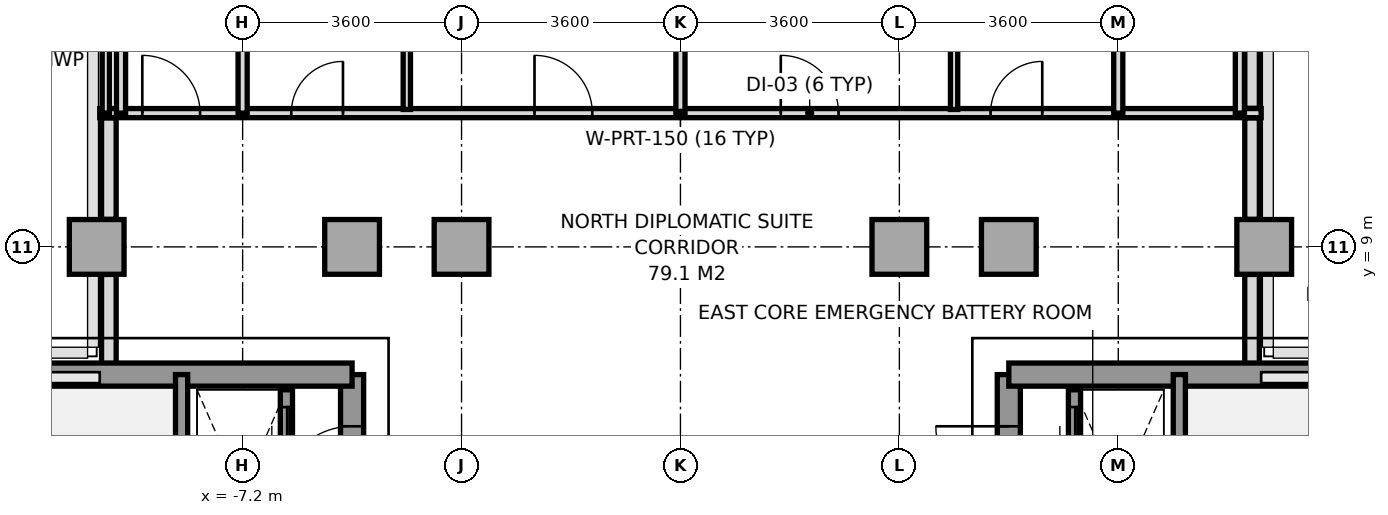
"""IFC4 building model, lengths in metres.
Left out: names, types, materials, properties, quantities, classifications, styles, units other than length and angle.
Written with IfcOpenShell. Run it as: python <this file> out.ifc"""

import sys

from ifc_helpers import new_model, si_unit, direction, frame, frame_2d, origin, origin_2d, place, context, subcontext, project, spatial, rectangle, extrude, source, transform, mapped, element, fill, save


model = new_model("IFC4")
c1 = context("Model", 3, precision=1e-05, world=origin(), true_north=direction((0.0, 1.0)))
c2 = subcontext(c1, "Body", "Model", "MODEL_VIEW")
j1 = project(units=[si_unit("LENGTHUNIT", "METRE"), si_unit("PLANEANGLEUNIT", "RADIAN")], contexts=[c1])
p1 = place(None, origin())
s1 = spatial("IfcSite", under=j1, at=p1, CompositionType="ELEMENT")
p2 = place(p1, origin())
s2 = spatial("IfcBuilding", under=s1, at=p2, CompositionType="ELEMENT")
p3 = place(p2, frame((0.0, 0.0, 197.8)))
s3 = spatial("IfcBuildingStorey", under=s2, at=p3, CompositionType="ELEMENT", Elevation=197.8)
m1 = source(origin(), c2, "Body", "SweptSolid", [
    extrude(rectangle(XDim=0.9, YDim=0.9, at=origin_2d()), origin(), (0.0, 0.0, 1.0), 3.2),
])
for number, where, z_axis, x_axis in (
    (1, (-9.6, 9.0, 0.0), (0.0, 0.0, 1.0), (1.0, 0.0, 0.0)),
    (2, (-5.4, 9.0, 0.0), (0.0, 0.0, 1.0), (1.0, 0.0, 0.0)),
    (3, (-3.6, 9.0, 0.0), (0.0, 0.0, 1.0), (1.0, 0.0, 0.0)),
    (4, (3.6, 9.0, 0.0), (0.0, 0.0, 1.0), (1.0, 0.0, 0.0)),
    (5, (5.4, 9.0, 0.0), (0.0, 0.0, 1.0), (1.0, 0.0, 0.0)),
    (6, (9.6, 9.0, 0.0), (0.0, 0.0, 1.0), (1.0, 0.0, 0.0)),
):
    element("IfcColumn", number, at=place(p3, frame(where, z_axis=z_axis, x_axis=x_axis)), inside=s3, PredefinedType="COLUMN", context=c2, shape_type="MappedRepresentation", body=[
        mapped(m1, transform((0.0, 0.0, 0.0), x_axis=(1.0, 0.0, 0.0), y_axis=(0.0, 1.0, 0.0), z_axis=(0.0, 0.0, 1.0), scale=1.0)),
    ])
p4 = place(p3, frame((-9.4, 6.953, 0.0), z_axis=(0.0, 0.0, 1.0), x_axis=(0.0, 1.0, 0.0)))
e7 = element("IfcWall", 7, at=p4, inside=s3, PredefinedType="PARAPET", context=c2, shape_type="SweptSolid", body=[
    extrude(rectangle(XDim=1.594, YDim=0.24, at=frame_2d((0.797, 0.0))), origin(), (0.0, 0.0, 1.0), 1.15),
])
p5 = place(p3, frame((-9.4, 9.453, 0.0), z_axis=(0.0, 0.0, 1.0), x_axis=(0.0, 1.0, 0.0)))
e8 = element("IfcWall", 8, at=p5, inside=s3, PredefinedType="PARAPET", context=c2, shape_type="SweptSolid", body=[
    extrude(rectangle(XDim=1.669, YDim=0.24, at=frame_2d((0.834, 0.0))), origin(), (0.0, 0.0, 1.0), 1.15),
])
p6 = place(p3, frame((9.4, 15.358, 0.0), z_axis=(0.0, 0.0, 1.0), x_axis=(0.0, -1.0, 0.0)))
e9 = element("IfcWall", 9, at=p6, inside=s3, PredefinedType="PARAPET", context=c2, shape_type="SweptSolid", body=[
    extrude(rectangle(XDim=4.08, YDim=0.24, at=frame_2d((2.04, 0.0))), origin(), (0.0, 0.0, 1.0), 1.15),
])
p7 = place(p3, frame((9.4, 11.122, 0.0), z_axis=(0.0, 0.0, 1.0), x_axis=(0.0, -1.0, 0.0)))
e10 = element("IfcWall", 10, at=p7, inside=s3, PredefinedType="PARAPET", context=c2, shape_type="SweptSolid", body=[
    extrude(rectangle(XDim=1.669, YDim=0.24, at=frame_2d((0.834, 0.0))), origin(), (0.0, 0.0, 1.0), 1.15),
])
p8 = place(p3, frame((9.4, 8.547, 0.0), z_axis=(0.0, 0.0, 1.0), x_axis=(0.0, -1.0, 0.0)))
e11 = element("IfcWall", 11, at=p8, inside=s3, PredefinedType="PARAPET", context=c2, shape_type="SweptSolid", body=[
    extrude(rectangle(XDim=1.594, YDim=0.24, at=frame_2d((0.797, 0.0))), origin(), (0.0, 0.0, 1.0), 1.15),
])
p9 = place(p3, frame((-5.4, -5.6, 0.0), z_axis=(0.0, 0.0, 1.0), x_axis=(0.0, 1.0, 0.0)))
e12 = element("IfcWall", 12, at=p9, inside=s3, PredefinedType="SHEAR", context=c2, shape_type="SweptSolid", body=[
    extrude(rectangle(XDim=12.5, YDim=0.38, at=frame_2d((6.25, 0.0))), origin(), (0.0, 0.0, 1.0), 3.2),
])
p10 = place(p9, frame((4.55, 0.0, 0.0)))
e13 = element("IfcOpeningElement", 13, at=p10, cuts=e12, PredefinedType="OPENING", context=c2, shape_type="SweptSolid", body=[
    extrude(rectangle(XDim=1.2, YDim=2.2, at=frame_2d((0.6, 1.1))), frame((0.0, 0.2, 0.0), z_axis=(0.0, -1.0, 0.0), x_axis=(1.0, 0.0, 0.0)), (0.0, 0.0, 1.0), 0.4),
])
p11 = place(p9, frame((10.45, 0.0, 0.0)))
e14 = element("IfcOpeningElement", 14, at=p11, cuts=e12, PredefinedType="OPENING", context=c2, shape_type="SweptSolid", body=[
    extrude(rectangle(XDim=1.2, YDim=2.2, at=frame_2d((0.6, 1.1))), frame((0.0, 0.2, 0.0), z_axis=(0.0, -1.0, 0.0), x_axis=(1.0, 0.0, 0.0)), (0.0, 0.0, 1.0), 0.4),
])
p12 = place(p3, frame((-11.356, 6.9, 0.0), z_axis=(0.0, 0.0, 1.0), x_axis=(1.0, 0.0, 0.0)))
e15 = element("IfcWall", 15, at=p12, inside=s3, PredefinedType="SHEAR", context=c2, shape_type="SweptSolid", body=[
    extrude(rectangle(XDim=5.956, YDim=0.38, at=frame_2d((2.978, 0.0))), origin(), (0.0, 0.0, 1.0), 3.2),
])
p13 = place(p3, frame((-8.204, -0.016, 0.0), z_axis=(0.0, 0.0, 1.0), x_axis=(0.0, 1.0, 0.0)))
e16 = element("IfcWall", 16, at=p13, inside=s3, PredefinedType="SOLIDWALL", context=c2, shape_type="SweptSolid", body=[
    extrude(rectangle(XDim=6.916, YDim=0.2, at=frame_2d((3.458, 0.0))), origin(), (0.0, 0.0, 1.0), 3.2),
])
p14 = place(p13, frame((0.2, 0.0, 0.0)))
e17 = element("IfcOpeningElement", 17, at=p14, cuts=e16, PredefinedType="OPENING", context=c2, shape_type="SweptSolid", body=[
    extrude(rectangle(XDim=1.2, YDim=2.2, at=frame_2d((0.6, 1.1))), frame((0.0, 0.11, 0.0), z_axis=(0.0, -1.0, 0.0), x_axis=(1.0, 0.0, 0.0)), (0.0, 0.0, 1.0), 0.22),
])
p15 = place(p3, frame((5.4, -5.6, 0.0), z_axis=(0.0, 0.0, 1.0), x_axis=(0.0, 1.0, 0.0)))
e18 = element("IfcWall", 18, at=p15, inside=s3, PredefinedType="SHEAR", context=c2, shape_type="SweptSolid", body=[
    extrude(rectangle(XDim=12.5, YDim=0.38, at=frame_2d((6.25, 0.0))), origin(), (0.0, 0.0, 1.0), 3.2),
])
p16 = place(p15, frame((4.55, 0.0, 0.0)))
e19 = element("IfcOpeningElement", 19, at=p16, cuts=e18, PredefinedType="OPENING", context=c2, shape_type="SweptSolid", body=[
    extrude(rectangle(XDim=1.2, YDim=2.2, at=frame_2d((0.6, 1.1))), frame((0.0, 0.2, 0.0), z_axis=(0.0, -1.0, 0.0), x_axis=(1.0, 0.0, 0.0)), (0.0, 0.0, 1.0), 0.4),
])
p17 = place(p15, frame((10.45, 0.0, 0.0)))
e20 = element("IfcOpeningElement", 20, at=p17, cuts=e18, PredefinedType="OPENING", context=c2, shape_type="SweptSolid", body=[
    extrude(rectangle(XDim=1.2, YDim=2.2, at=frame_2d((0.6, 1.1))), frame((0.0, 0.2, 0.0), z_axis=(0.0, -1.0, 0.0), x_axis=(1.0, 0.0, 0.0)), (0.0, 0.0, 1.0), 0.4),
])
p18 = place(p15, frame((7.88, 0.0, 0.0)))
e21 = element("IfcOpeningElement", 21, at=p18, cuts=e18, PredefinedType="OPENING", context=c2, shape_type="SweptSolid", body=[
    extrude(rectangle(XDim=0.8, YDim=2.1, at=frame_2d((0.4, 1.05))), frame((0.0, 0.2, 0.0), z_axis=(0.0, -1.0, 0.0), x_axis=(1.0, 0.0, 0.0)), (0.0, 0.0, 1.0), 0.4),
])
p19 = place(p3, frame((5.4, 6.9, 0.0), z_axis=(0.0, 0.0, 1.0), x_axis=(1.0, 0.0, 0.0)))
e22 = element("IfcWall", 22, at=p19, inside=s3, PredefinedType="SHEAR", context=c2, shape_type="SweptSolid", body=[
    extrude(rectangle(XDim=5.956, YDim=0.38, at=frame_2d((2.978, 0.0))), origin(), (0.0, 0.0, 1.0), 3.2),
])
p20 = place(p3, frame((8.204, -0.016, 0.0), z_axis=(0.0, 0.0, 1.0), x_axis=(0.0, 1.0, 0.0)))
e23 = element("IfcWall", 23, at=p20, inside=s3, PredefinedType="SOLIDWALL", context=c2, shape_type="SweptSolid", body=[
    extrude(rectangle(XDim=6.916, YDim=0.2, at=frame_2d((3.458, 0.0))), origin(), (0.0, 0.0, 1.0), 3.2),
])
p21 = place(p20, frame((0.2, 0.0, 0.0)))
e24 = element("IfcOpeningElement", 24, at=p21, cuts=e23, PredefinedType="OPENING", context=c2, shape_type="SweptSolid", body=[
    extrude(rectangle(XDim=1.2, YDim=2.2, at=frame_2d((0.6, 1.1))), frame((0.0, 0.11, 0.0), z_axis=(0.0, -1.0, 0.0), x_axis=(1.0, 0.0, 0.0)), (0.0, 0.0, 1.0), 0.22),
])
p22 = place(p3, frame((-6.48, 4.98, 0.0), z_axis=(0.0, 0.0, 1.0), x_axis=(0.0, 1.0, 0.0)))
e25 = element("IfcWall", 25, at=p22, inside=s3, PredefinedType="SOLIDWALL", context=c2, shape_type="SweptSolid", body=[
    extrude(rectangle(XDim=1.67, YDim=0.2, at=frame_2d((0.835, 0.0))), origin(), (0.0, 0.0, 1.0), 3.2),
])
p23 = place(p22, frame((0.285, 0.0, 0.0)))
e26 = element("IfcOpeningElement", 26, at=p23, cuts=e25, PredefinedType="OPENING", context=c2, shape_type="SweptSolid", body=[
    extrude(rectangle(XDim=1.1, YDim=2.2, at=frame_2d((0.55, 1.1))), frame((0.0, 0.11, 0.0), z_axis=(0.0, -1.0, 0.0), x_axis=(1.0, 0.0, 0.0)), (0.0, 0.0, 1.0), 0.22),
])
p24 = place(p3, frame((6.48, 4.98, 0.0), z_axis=(0.0, 0.0, 1.0), x_axis=(0.0, 1.0, 0.0)))
e27 = element("IfcWall", 27, at=p24, inside=s3, PredefinedType="SOLIDWALL", context=c2, shape_type="SweptSolid", body=[
    extrude(rectangle(XDim=1.67, YDim=0.2, at=frame_2d((0.835, 0.0))), origin(), (0.0, 0.0, 1.0), 3.2),
])
p25 = place(p24, frame((0.285, 0.0, 0.0)))
e28 = element("IfcOpeningElement", 28, at=p25, cuts=e27, PredefinedType="OPENING", context=c2, shape_type="SweptSolid", body=[
    extrude(rectangle(XDim=1.1, YDim=2.2, at=frame_2d((0.55, 1.1))), frame((0.0, 0.11, 0.0), z_axis=(0.0, -1.0, 0.0), x_axis=(1.0, 0.0, 0.0)), (0.0, 0.0, 1.0), 0.22),
])
p26 = place(p3, frame((-9.55, 11.2, 0.0), z_axis=(0.0, 0.0, 1.0), x_axis=(1.0, 0.0, 0.0)))
e29 = element("IfcWall", 29, at=p26, inside=s3, PredefinedType="PARTITIONING", context=c2, shape_type="SweptSolid", body=[
    extrude(rectangle(XDim=19.1, YDim=0.15, at=frame_2d((9.55, 0.0))), origin(), (0.0, 0.0, 1.0), 3.2),
])
p27 = place(p26, frame((0.7, 0.0, 0.0)))
e30 = element("IfcOpeningElement", 30, at=p27, cuts=e29, PredefinedType="OPENING", context=c2, shape_type="SweptSolid", body=[
    extrude(rectangle(XDim=0.95, YDim=2.15, at=frame_2d((0.475, 1.075))), frame((0.0, 0.085, 0.0), z_axis=(0.0, -1.0, 0.0), x_axis=(1.0, 0.0, 0.0)), (0.0, 0.0, 1.0), 0.17),
])
p28 = place(p26, frame((3.15, 0.0, 0.0)))
e31 = element("IfcOpeningElement", 31, at=p28, cuts=e29, PredefinedType="OPENING", context=c2, shape_type="SweptSolid", body=[
    extrude(rectangle(XDim=0.85, YDim=2.1, at=frame_2d((0.425, 1.05))), frame((0.0, 0.085, 0.0), z_axis=(0.0, -1.0, 0.0), x_axis=(1.0, 0.0, 0.0)), (0.0, 0.0, 1.0), 0.17),
])
p29 = place(p26, frame((7.15, 0.0, 0.0)))
e32 = element("IfcOpeningElement", 32, at=p29, cuts=e29, PredefinedType="OPENING", context=c2, shape_type="SweptSolid", body=[
    extrude(rectangle(XDim=0.95, YDim=2.15, at=frame_2d((0.475, 1.075))), frame((0.0, 0.085, 0.0), z_axis=(0.0, -1.0, 0.0), x_axis=(1.0, 0.0, 0.0)), (0.0, 0.0, 1.0), 0.17),
])
p30 = place(p26, frame((14.65, 0.0, 0.0)))
e33 = element("IfcOpeningElement", 33, at=p30, cuts=e29, PredefinedType="OPENING", context=c2, shape_type="SweptSolid", body=[
    extrude(rectangle(XDim=0.85, YDim=2.1, at=frame_2d((0.425, 1.05))), frame((0.0, 0.085, 0.0), z_axis=(0.0, -1.0, 0.0), x_axis=(1.0, 0.0, 0.0)), (0.0, 0.0, 1.0), 0.17),
])
p31 = place(p26, frame((11.2, 0.0, 0.0)))
e34 = element("IfcOpeningElement", 34, at=p31, cuts=e29, PredefinedType="OPENING", context=c2, shape_type="SweptSolid", body=[
    extrude(rectangle(XDim=0.95, YDim=2.15, at=frame_2d((0.475, 1.075))), frame((0.0, 0.085, 0.0), z_axis=(0.0, -1.0, 0.0), x_axis=(1.0, 0.0, 0.0)), (0.0, 0.0, 1.0), 0.17),
])
for number, where, z_axis, x_axis in (
    (35, (-9.2, 11.2, 0.0), (0.0, 0.0, 1.0), (0.0, 1.0, 0.0)),
    (36, (9.2, 11.2, 0.0), (0.0, 0.0, 1.0), (0.0, 1.0, 0.0)),
):
    element("IfcWall", number, at=place(p3, frame(where, z_axis=z_axis, x_axis=x_axis)), inside=s3, PredefinedType="PARTITIONING", context=c2, shape_type="SweptSolid", body=[
        extrude(rectangle(XDim=4.48, YDim=0.15, at=frame_2d((2.24, 0.0))), origin(), (0.0, 0.0, 1.0), 3.2),
    ])
p32 = place(p3, frame((-7.2, 11.2, 0.0), z_axis=(0.0, 0.0, 1.0), x_axis=(0.0, 1.0, 0.0)))
e37 = element("IfcWall", 37, at=p32, inside=s3, PredefinedType="PARTITIONING", context=c2, shape_type="SweptSolid", body=[
    extrude(rectangle(XDim=12.2, YDim=0.15, at=frame_2d((6.1, 0.0))), origin(), (0.0, 0.0, 1.0), 2.75),
])
p33 = place(p3, frame((0.0, 11.2, 0.0), z_axis=(0.0, 0.0, 1.0), x_axis=(0.0, 1.0, 0.0)))
e38 = element("IfcWall", 38, at=p33, inside=s3, PredefinedType="PARTITIONING", context=c2, shape_type="SweptSolid", body=[
    extrude(rectangle(XDim=13.45, YDim=0.15, at=frame_2d((6.725, 0.0))), origin(), (0.0, 0.0, 1.0), 2.75),
])
p34 = place(p3, frame((7.2, 11.2, 0.0), z_axis=(0.0, 0.0, 1.0), x_axis=(0.0, 1.0, 0.0)))
e39 = element("IfcWall", 39, at=p34, inside=s3, PredefinedType="PARTITIONING", context=c2, shape_type="SweptSolid", body=[
    extrude(rectangle(XDim=12.2, YDim=0.15, at=frame_2d((6.1, 0.0))), origin(), (0.0, 0.0, 1.0), 2.75),
])
p35 = place(p3, frame((-9.45, 11.2, 0.0), z_axis=(0.0, 0.0, 1.0), x_axis=(0.0, 1.0, 0.0)))
e40 = element("IfcWall", 40, at=p35, inside=s3, PredefinedType="PARTITIONING", context=c2, shape_type="SweptSolid", body=[
    extrude(rectangle(XDim=3.6, YDim=0.12, at=frame_2d((1.8, 0.0))), origin(), (0.0, 0.0, 1.0), 3.2),
])
for number, where, z_axis, x_axis in (
    (41, (-4.5, 11.26, 0.0), (0.0, 0.0, 1.0), (0.0, 1.0, 0.0)),
    (42, (4.5, 11.26, 0.0), (0.0, 0.0, 1.0), (0.0, 1.0, 0.0)),
):
    element("IfcWall", number, at=place(p3, frame(where, z_axis=z_axis, x_axis=x_axis)), inside=s3, PredefinedType="PARTITIONING", context=c2, shape_type="SweptSolid", body=[
        extrude(rectangle(XDim=3.1, YDim=0.12, at=frame_2d((1.55, 0.0))), origin(), (0.0, 0.0, 1.0), 2.75),
    ])
m2 = source(origin(), c2, "Body", "SweptSolid", [
    extrude(rectangle(XDim=1.2, YDim=2.2, at=frame_2d((0.6, 1.1))), frame((0.0, 0.025, 0.0), z_axis=(0.0, -1.0, 0.0), x_axis=(1.0, 0.0, 0.0)), (0.0, 0.0, 1.0), 0.05),
])
p36 = place(p11, origin())
e43 = element("IfcDoor", 43, at=p36, inside=s3, OperationType="SINGLE_SWING_LEFT", PredefinedType="DOOR", context=c2, shape_type="MappedRepresentation", body=[
    mapped(m2, transform((0.0, 0.0, 0.0), x_axis=(1.0, 0.0, 0.0), y_axis=(0.0, 1.0, 0.0), z_axis=(0.0, 0.0, 1.0), scale=1.0)),
])
fill(e14, e43)
p37 = place(p17, origin())
e44 = element("IfcDoor", 44, at=p37, inside=s3, OperationType="SINGLE_SWING_RIGHT", PredefinedType="DOOR", context=c2, shape_type="MappedRepresentation", body=[
    mapped(m2, transform((0.0, 0.0, 0.0), x_axis=(1.0, 0.0, 0.0), y_axis=(0.0, 1.0, 0.0), z_axis=(0.0, 0.0, 1.0), scale=1.0)),
])
fill(e20, e44)
m3 = source(origin(), c2, "Body", "SweptSolid", [
    extrude(rectangle(XDim=1.1, YDim=2.2, at=frame_2d((0.55, 1.1))), frame((0.0, 0.025, 0.0), z_axis=(0.0, -1.0, 0.0), x_axis=(1.0, 0.0, 0.0)), (0.0, 0.0, 1.0), 0.05),
])
p38 = place(p23, origin())
e45 = element("IfcDoor", 45, at=p38, inside=s3, OperationType="SLIDING_TO_LEFT", PredefinedType="DOOR", context=c2, shape_type="MappedRepresentation", body=[
    mapped(m3, transform((0.0, 0.0, 0.0), x_axis=(1.0, 0.0, 0.0), y_axis=(0.0, 1.0, 0.0), z_axis=(0.0, 0.0, 1.0), scale=1.0)),
])
fill(e26, e45)
p39 = place(p25, origin())
e46 = element("IfcDoor", 46, at=p39, inside=s3, OperationType="SLIDING_TO_LEFT", PredefinedType="DOOR", context=c2, shape_type="MappedRepresentation", body=[
    mapped(m3, transform((0.0, 0.0, 0.0), x_axis=(1.0, 0.0, 0.0), y_axis=(0.0, 1.0, 0.0), z_axis=(0.0, 0.0, 1.0), scale=1.0)),
])
fill(e28, e46)
m4 = source(origin(), c2, "Body", "SweptSolid", [
    extrude(rectangle(XDim=0.95, YDim=2.15, at=frame_2d((0.475, 1.075))), frame((0.0, 0.025, 0.0), z_axis=(0.0, -1.0, 0.0), x_axis=(1.0, 0.0, 0.0)), (0.0, 0.0, 1.0), 0.05),
])
p40 = place(p27, origin())
e47 = element("IfcDoor", 47, at=p40, inside=s3, OperationType="SINGLE_SWING_LEFT", PredefinedType="DOOR", context=c2, shape_type="MappedRepresentation", body=[
    mapped(m4, transform((0.0, 0.0, 0.0), x_axis=(1.0, 0.0, 0.0), y_axis=(0.0, 1.0, 0.0), z_axis=(0.0, 0.0, 1.0), scale=1.0)),
])
fill(e30, e47)
m5 = source(origin(), c2, "Body", "SweptSolid", [
    extrude(rectangle(XDim=0.85, YDim=2.1, at=frame_2d((0.425, 1.05))), frame((0.0, 0.025, 0.0), z_axis=(0.0, -1.0, 0.0), x_axis=(1.0, 0.0, 0.0)), (0.0, 0.0, 1.0), 0.05),
])
p41 = place(p28, origin())
e48 = element("IfcDoor", 48, at=p41, inside=s3, OperationType="SINGLE_SWING_RIGHT", PredefinedType="DOOR", context=c2, shape_type="MappedRepresentation", body=[
    mapped(m5, transform((0.0, 0.0, 0.0), x_axis=(1.0, 0.0, 0.0), y_axis=(0.0, 1.0, 0.0), z_axis=(0.0, 0.0, 1.0), scale=1.0)),
])
fill(e31, e48)
p42 = place(p29, origin())
e49 = element("IfcDoor", 49, at=p42, inside=s3, OperationType="SINGLE_SWING_LEFT", PredefinedType="DOOR", context=c2, shape_type="MappedRepresentation", body=[
    mapped(m4, transform((0.0, 0.0, 0.0), x_axis=(1.0, 0.0, 0.0), y_axis=(0.0, 1.0, 0.0), z_axis=(0.0, 0.0, 1.0), scale=1.0)),
])
fill(e32, e49)
p43 = place(p30, origin())
e50 = element("IfcDoor", 50, at=p43, inside=s3, OperationType="SINGLE_SWING_RIGHT", PredefinedType="DOOR", context=c2, shape_type="MappedRepresentation", body=[
    mapped(m5, transform((0.0, 0.0, 0.0), x_axis=(1.0, 0.0, 0.0), y_axis=(0.0, 1.0, 0.0), z_axis=(0.0, 0.0, 1.0), scale=1.0)),
])
fill(e33, e50)
p44 = place(p31, origin())
e51 = element("IfcDoor", 51, at=p44, inside=s3, OperationType="SINGLE_SWING_LEFT", PredefinedType="DOOR", context=c2, shape_type="MappedRepresentation", body=[
    mapped(m4, transform((0.0, 0.0, 0.0), x_axis=(1.0, 0.0, 0.0), y_axis=(0.0, 1.0, 0.0), z_axis=(0.0, 0.0, 1.0), scale=1.0)),
])
fill(e34, e51)
save(model, sys.argv[1])
